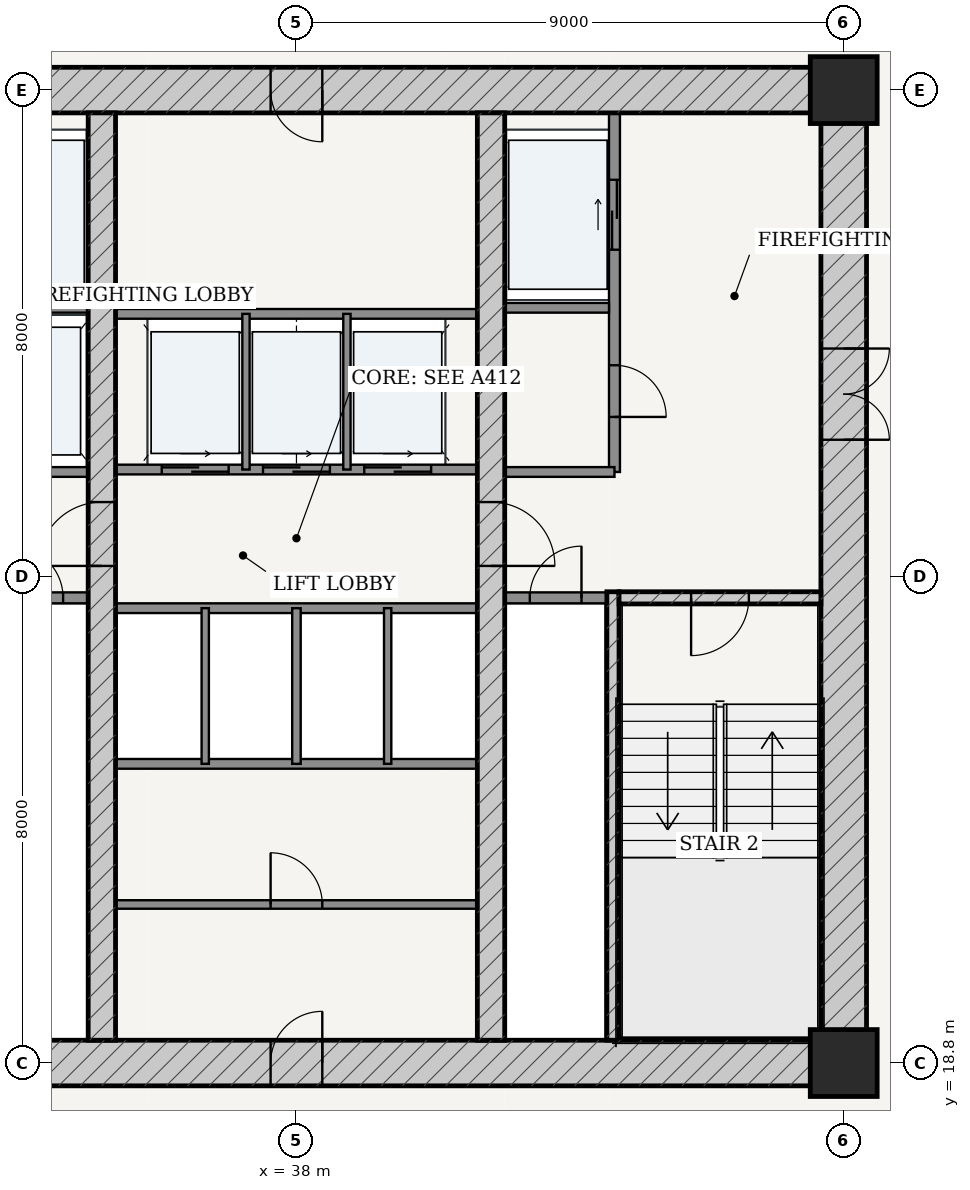
"""IFC4 building model, lengths in metres.
Left out: names, types, materials, properties, quantities, classifications, styles, units other than length and angle.
Written with IfcOpenShell. Run it as: python <this file> out.ifc"""

import sys

from ifc_helpers import new_model, si_unit, direction, frame, frame_2d, origin, origin_2d, place, context, subcontext, project, spatial, rectangle, extrude, source, transform, mapped, element, fill, save


model = new_model("IFC4")
c1 = context("Model", 3, precision=1e-05, world=origin(), true_north=direction((-0.2419218956, 0.970295726276)))
c2 = subcontext(c1, "Body", "Model", "MODEL_VIEW")
j1 = project(units=[si_unit("LENGTHUNIT", "METRE"), si_unit("PLANEANGLEUNIT", "RADIAN")], contexts=[c1])
p1 = place(None, origin())
s1 = spatial("IfcSite", under=j1, at=p1, CompositionType="ELEMENT")
p2 = place(p1, origin())
s2 = spatial("IfcBuilding", under=s1, at=p2, CompositionType="ELEMENT")
p3 = place(p2, frame((0.0, 0.0, 56.4)))
s3 = spatial("IfcBuildingStorey", under=s2, at=p3, CompositionType="ELEMENT", Elevation=56.4)
for number, where, z_axis, x_axis in (
    (1, (47.0, 18.8, 0.0), (0.0, 0.0, 1.0), (1.0, 0.0, 0.0)),
    (2, (47.0, 34.8, 0.0), (0.0, 0.0, 1.0), (1.0, 0.0, 0.0)),
):
    element("IfcColumn", number, at=place(p3, frame(where, z_axis=z_axis, x_axis=x_axis)), inside=s3, PredefinedType="COLUMN", context=c2, shape_type="SweptSolid", body=[
        extrude(rectangle(XDim=1.1, YDim=1.1, at=origin_2d()), origin(), (0.0, 0.0, 1.0), 3.6),
    ])
p4 = place(p3, frame((28.625, 18.8, 0.0), z_axis=(0.0, 0.0, 1.0), x_axis=(1.0, 0.0, 0.0)))
e3 = element("IfcWall", 3, at=p4, inside=s3, PredefinedType="SHEAR", context=c2, shape_type="SweptSolid", body=[
    extrude(rectangle(XDim=18.75, YDim=0.75, at=frame_2d((9.375, 0.0))), origin(), (0.0, 0.0, 1.0), 3.32),
])
p5 = place(p4, frame((8.95, 0.0, 0.0)))
e4 = element("IfcOpeningElement", 4, at=p5, cuts=e3, PredefinedType="OPENING", context=c2, shape_type="SweptSolid", body=[
    extrude(rectangle(XDim=0.85, YDim=2.1, at=frame_2d((0.425, 1.05))), frame((0.0, 0.385, 0.0), z_axis=(0.0, -1.0, 0.0), x_axis=(1.0, 0.0, 0.0)), (0.0, 0.0, 1.0), 0.77),
])
p6 = place(p3, frame((28.625, 34.8, 0.0), z_axis=(0.0, 0.0, 1.0), x_axis=(1.0, 0.0, 0.0)))
e5 = element("IfcWall", 5, at=p6, inside=s3, PredefinedType="SHEAR", context=c2, shape_type="SweptSolid", body=[
    extrude(rectangle(XDim=18.75, YDim=0.75, at=frame_2d((9.375, 0.0))), origin(), (0.0, 0.0, 1.0), 3.32),
])
p7 = place(p6, frame((8.95, 0.0, 0.0)))
e6 = element("IfcOpeningElement", 6, at=p7, cuts=e5, PredefinedType="OPENING", context=c2, shape_type="SweptSolid", body=[
    extrude(rectangle(XDim=0.85, YDim=2.1, at=frame_2d((0.425, 1.05))), frame((0.0, 0.385, 0.0), z_axis=(0.0, -1.0, 0.0), x_axis=(1.0, 0.0, 0.0)), (0.0, 0.0, 1.0), 0.77),
])
p8 = place(p3, frame((47.0, 19.175, 0.0), z_axis=(0.0, 0.0, 1.0), x_axis=(0.0, 1.0, 0.0)))
e7 = element("IfcWall", 7, at=p8, inside=s3, PredefinedType="SHEAR", context=c2, shape_type="SweptSolid", body=[
    extrude(rectangle(XDim=15.25, YDim=0.75, at=frame_2d((7.625, 0.0))), origin(), (0.0, 0.0, 1.0), 3.32),
])
p9 = place(p8, frame((9.875, 0.0, 0.0)))
e8 = element("IfcOpeningElement", 8, at=p9, cuts=e7, PredefinedType="OPENING", context=c2, shape_type="SweptSolid", body=[
    extrude(rectangle(XDim=1.5, YDim=2.2, at=frame_2d((0.75, 1.1))), frame((0.0, 0.385, 0.0), z_axis=(0.0, -1.0, 0.0), x_axis=(1.0, 0.0, 0.0)), (0.0, 0.0, 1.0), 0.77),
])
p10 = place(p3, frame((43.205, 19.175, 0.0), z_axis=(0.0, 0.0, 1.0), x_axis=(0.0, 1.0, 0.0)))
e9 = element("IfcWall", 9, at=p10, inside=s3, PredefinedType="SOLIDWALL", context=c2, shape_type="SweptSolid", body=[
    extrude(rectangle(XDim=7.375, YDim=0.2, at=frame_2d((3.688, 0.0))), origin(), (0.0, 0.0, 1.0), 3.32),
])
p11 = place(p3, frame((43.305, 26.45, 0.0), z_axis=(0.0, 0.0, 1.0), x_axis=(1.0, 0.0, 0.0)))
e10 = element("IfcWall", 10, at=p11, inside=s3, PredefinedType="SOLIDWALL", context=c2, shape_type="SweptSolid", body=[
    extrude(rectangle(XDim=3.32, YDim=0.2, at=frame_2d((1.66, 0.0))), origin(), (0.0, 0.0, 1.0), 3.32),
])
p12 = place(p11, frame((1.185, 0.0, 0.0)))
e11 = element("IfcOpeningElement", 11, at=p12, cuts=e10, PredefinedType="OPENING", context=c2, shape_type="SweptSolid", body=[
    extrude(rectangle(XDim=0.95, YDim=2.15, at=frame_2d((0.475, 1.075))), frame((0.0, 0.11, 0.0), z_axis=(0.0, -1.0, 0.0), x_axis=(1.0, 0.0, 0.0)), (0.0, 0.0, 1.0), 0.22),
])
p13 = place(p3, frame((34.8, 19.175, 0.0), z_axis=(0.0, 0.0, 1.0), x_axis=(0.0, 1.0, 0.0)))
e12 = element("IfcWall", 12, at=p13, inside=s3, PredefinedType="SHEAR", context=c2, shape_type="SweptSolid", body=[
    extrude(rectangle(XDim=15.25, YDim=0.45, at=frame_2d((7.625, 0.0))), origin(), (0.0, 0.0, 1.0), 3.32),
])
p14 = place(p13, frame((7.8, 0.0, 0.0)))
e13 = element("IfcOpeningElement", 13, at=p14, cuts=e12, PredefinedType="OPENING", context=c2, shape_type="SweptSolid", body=[
    extrude(rectangle(XDim=1.05, YDim=2.15, at=frame_2d((0.525, 1.075))), frame((0.0, 0.235, 0.0), z_axis=(0.0, -1.0, 0.0), x_axis=(1.0, 0.0, 0.0)), (0.0, 0.0, 1.0), 0.47),
])
p15 = place(p3, frame((41.2, 19.175, 0.0), z_axis=(0.0, 0.0, 1.0), x_axis=(0.0, 1.0, 0.0)))
e14 = element("IfcWall", 14, at=p15, inside=s3, PredefinedType="SHEAR", context=c2, shape_type="SweptSolid", body=[
    extrude(rectangle(XDim=15.25, YDim=0.45, at=frame_2d((7.625, 0.0))), origin(), (0.0, 0.0, 1.0), 3.32),
])
p16 = place(p15, frame((7.8, 0.0, 0.0)))
e15 = element("IfcOpeningElement", 15, at=p16, cuts=e14, PredefinedType="OPENING", context=c2, shape_type="SweptSolid", body=[
    extrude(rectangle(XDim=1.05, YDim=2.15, at=frame_2d((0.525, 1.075))), frame((0.0, 0.235, 0.0), z_axis=(0.0, -1.0, 0.0), x_axis=(1.0, 0.0, 0.0)), (0.0, 0.0, 1.0), 0.47),
])
p17 = place(p3, frame((32.9, 26.45, 0.0), z_axis=(0.0, 0.0, 1.0), x_axis=(1.0, 0.0, 0.0)))
e16 = element("IfcWall", 16, at=p17, inside=s3, PredefinedType="PARTITIONING", context=c2, shape_type="SweptSolid", body=[
    extrude(rectangle(XDim=1.675, YDim=0.18, at=frame_2d((0.837, 0.0))), origin(), (0.0, 0.0, 1.0), 3.32),
])
p18 = place(p17, frame((0.413, 0.0, 0.0)))
e17 = element("IfcOpeningElement", 17, at=p18, cuts=e16, PredefinedType="OPENING", context=c2, shape_type="SweptSolid", body=[
    extrude(rectangle(XDim=0.85, YDim=2.1, at=frame_2d((0.425, 1.05))), frame((0.0, 0.1, 0.0), z_axis=(0.0, -1.0, 0.0), x_axis=(1.0, 0.0, 0.0)), (0.0, 0.0, 1.0), 0.2),
])
p19 = place(p3, frame((41.425, 26.45, 0.0), z_axis=(0.0, 0.0, 1.0), x_axis=(1.0, 0.0, 0.0)))
e18 = element("IfcWall", 18, at=p19, inside=s3, PredefinedType="PARTITIONING", context=c2, shape_type="SweptSolid", body=[
    extrude(rectangle(XDim=1.675, YDim=0.18, at=frame_2d((0.837, 0.0))), origin(), (0.0, 0.0, 1.0), 3.32),
])
p20 = place(p19, frame((0.413, 0.0, 0.0)))
e19 = element("IfcOpeningElement", 19, at=p20, cuts=e18, PredefinedType="OPENING", context=c2, shape_type="SweptSolid", body=[
    extrude(rectangle(XDim=0.85, YDim=2.1, at=frame_2d((0.425, 1.05))), frame((0.0, 0.1, 0.0), z_axis=(0.0, -1.0, 0.0), x_axis=(1.0, 0.0, 0.0)), (0.0, 0.0, 1.0), 0.2),
])
p21 = place(p3, frame((32.86, 31.22, 0.0), z_axis=(0.0, 0.0, 1.0), x_axis=(1.0, 0.0, 0.0)))
e20 = element("IfcWall", 20, at=p21, inside=s3, PredefinedType="PARTITIONING", context=c2, shape_type="SweptSolid", body=[
    extrude(rectangle(XDim=1.715, YDim=0.16, at=frame_2d((0.857, 0.0))), origin(), (0.0, 0.0, 1.0), 3.32),
])
p22 = place(p3, frame((32.77, 28.52, 0.0), z_axis=(0.0, 0.0, 1.0), x_axis=(1.0, 0.0, 0.0)))
e21 = element("IfcWall", 21, at=p22, inside=s3, PredefinedType="PARTITIONING", context=c2, shape_type="SweptSolid", body=[
    extrude(rectangle(XDim=1.805, YDim=0.16, at=frame_2d((0.902, 0.0))), origin(), (0.0, 0.0, 1.0), 3.32),
])
p23 = place(p3, frame((43.23, 28.52, 0.0), z_axis=(0.0, 0.0, 1.0), x_axis=(0.0, 1.0, 0.0)))
e22 = element("IfcWall", 22, at=p23, inside=s3, PredefinedType="PARTITIONING", context=c2, shape_type="SweptSolid", body=[
    extrude(rectangle(XDim=5.905, YDim=0.18, at=frame_2d((2.953, 0.0))), origin(), (0.0, 0.0, 1.0), 3.32),
])
p24 = place(p23, frame((0.905, 0.0, 0.0)))
e23 = element("IfcOpeningElement", 23, at=p24, cuts=e22, PredefinedType="OPENING", context=c2, shape_type="SweptSolid", body=[
    extrude(rectangle(XDim=0.85, YDim=2.1, at=frame_2d((0.425, 1.05))), frame((0.0, 0.1, 0.0), z_axis=(0.0, -1.0, 0.0), x_axis=(1.0, 0.0, 0.0)), (0.0, 0.0, 1.0), 0.2),
])
p25 = place(p23, frame((3.655, 0.0, 0.0)))
e24 = element("IfcOpeningElement", 24, at=p25, cuts=e22, PredefinedType="OPENING", context=c2, shape_type="SweptSolid", body=[
    extrude(rectangle(XDim=1.15, YDim=2.2, at=frame_2d((0.575, 1.1))), frame((0.0, 0.1, 0.0), z_axis=(0.0, -1.0, 0.0), x_axis=(1.0, 0.0, 0.0)), (0.0, 0.0, 1.0), 0.2),
])
p26 = place(p3, frame((41.425, 31.22, 0.0), z_axis=(0.0, 0.0, 1.0), x_axis=(1.0, 0.0, 0.0)))
e25 = element("IfcWall", 25, at=p26, inside=s3, PredefinedType="PARTITIONING", context=c2, shape_type="SweptSolid", body=[
    extrude(rectangle(XDim=1.715, YDim=0.16, at=frame_2d((0.857, 0.0))), origin(), (0.0, 0.0, 1.0), 3.32),
])
p27 = place(p3, frame((41.425, 28.52, 0.0), z_axis=(0.0, 0.0, 1.0), x_axis=(1.0, 0.0, 0.0)))
e26 = element("IfcWall", 26, at=p27, inside=s3, PredefinedType="PARTITIONING", context=c2, shape_type="SweptSolid", body=[
    extrude(rectangle(XDim=1.805, YDim=0.16, at=frame_2d((0.902, 0.0))), origin(), (0.0, 0.0, 1.0), 3.32),
])
p28 = place(p3, frame((35.025, 28.56, 0.0), z_axis=(0.0, 0.0, 1.0), x_axis=(1.0, 0.0, 0.0)))
e27 = element("IfcWall", 27, at=p28, inside=s3, PredefinedType="PARTITIONING", context=c2, shape_type="SweptSolid", body=[
    extrude(rectangle(XDim=5.95, YDim=0.16, at=frame_2d((2.975, 0.0))), origin(), (0.0, 0.0, 1.0), 3.32),
])
p29 = place(p28, frame((0.76, 0.0, 0.0)))
e28 = element("IfcOpeningElement", 28, at=p29, cuts=e27, PredefinedType="OPENING", context=c2, shape_type="SweptSolid", body=[
    extrude(rectangle(XDim=1.1, YDim=2.2, at=frame_2d((0.55, 1.1))), frame((0.0, 0.09, 0.0), z_axis=(0.0, -1.0, 0.0), x_axis=(1.0, 0.0, 0.0)), (0.0, 0.0, 1.0), 0.18),
])
p30 = place(p28, frame((2.425, 0.0, 0.0)))
e29 = element("IfcOpeningElement", 29, at=p30, cuts=e27, PredefinedType="OPENING", context=c2, shape_type="SweptSolid", body=[
    extrude(rectangle(XDim=1.1, YDim=2.2, at=frame_2d((0.55, 1.1))), frame((0.0, 0.09, 0.0), z_axis=(0.0, -1.0, 0.0), x_axis=(1.0, 0.0, 0.0)), (0.0, 0.0, 1.0), 0.18),
])
p31 = place(p28, frame((4.09, 0.0, 0.0)))
e30 = element("IfcOpeningElement", 30, at=p31, cuts=e27, PredefinedType="OPENING", context=c2, shape_type="SweptSolid", body=[
    extrude(rectangle(XDim=1.1, YDim=2.2, at=frame_2d((0.55, 1.1))), frame((0.0, 0.09, 0.0), z_axis=(0.0, -1.0, 0.0), x_axis=(1.0, 0.0, 0.0)), (0.0, 0.0, 1.0), 0.18),
])
p32 = place(p3, frame((35.025, 31.12, 0.0), z_axis=(0.0, 0.0, 1.0), x_axis=(1.0, 0.0, 0.0)))
e31 = element("IfcWall", 31, at=p32, inside=s3, PredefinedType="PARTITIONING", context=c2, shape_type="SweptSolid", body=[
    extrude(rectangle(XDim=5.95, YDim=0.16, at=frame_2d((2.975, 0.0))), origin(), (0.0, 0.0, 1.0), 3.32),
])
for number, where, z_axis, x_axis in (
    (32, (37.17, 28.56, 0.0), (0.0, 0.0, 1.0), (0.0, 1.0, 0.0)),
    (33, (38.83, 28.56, 0.0), (0.0, 0.0, 1.0), (0.0, 1.0, 0.0)),
):
    element("IfcWall", number, at=place(p3, frame(where, z_axis=z_axis, x_axis=x_axis)), inside=s3, PredefinedType="PARTITIONING", context=c2, shape_type="SweptSolid", body=[
        extrude(rectangle(XDim=2.56, YDim=0.12, at=frame_2d((1.28, 0.0))), origin(), (0.0, 0.0, 1.0), 3.32),
    ])
for number, where, z_axis, x_axis in (
    (34, (35.025, 26.28, 0.0), (0.0, 0.0, 1.0), (1.0, 0.0, 0.0)),
    (35, (35.025, 23.72, 0.0), (0.0, 0.0, 1.0), (1.0, 0.0, 0.0)),
):
    element("IfcWall", number, at=place(p3, frame(where, z_axis=z_axis, x_axis=x_axis)), inside=s3, PredefinedType="PARTITIONING", context=c2, shape_type="SweptSolid", body=[
        extrude(rectangle(XDim=5.95, YDim=0.16, at=frame_2d((2.975, 0.0))), origin(), (0.0, 0.0, 1.0), 3.32),
    ])
p33 = place(p3, frame((36.5, 23.72, 0.0), z_axis=(0.0, 0.0, 1.0), x_axis=(0.0, 1.0, 0.0)))
e36 = element("IfcWall", 36, at=p33, inside=s3, PredefinedType="PARTITIONING", context=c2, shape_type="SweptSolid", body=[
    extrude(rectangle(XDim=2.56, YDim=0.12, at=frame_2d((1.28, 0.0))), origin(), (0.0, 0.0, 1.0), 3.32),
])
p34 = place(p3, frame((38.0, 23.72, 0.0), z_axis=(0.0, 0.0, 1.0), x_axis=(0.0, 1.0, 0.0)))
e37 = element("IfcWall", 37, at=p34, inside=s3, PredefinedType="PARTITIONING", context=c2, shape_type="SweptSolid", body=[
    extrude(rectangle(XDim=2.56, YDim=0.14, at=frame_2d((1.28, 0.0))), origin(), (0.0, 0.0, 1.0), 3.32),
])
p35 = place(p3, frame((39.5, 23.72, 0.0), z_axis=(0.0, 0.0, 1.0), x_axis=(0.0, 1.0, 0.0)))
e38 = element("IfcWall", 38, at=p35, inside=s3, PredefinedType="PARTITIONING", context=c2, shape_type="SweptSolid", body=[
    extrude(rectangle(XDim=2.56, YDim=0.12, at=frame_2d((1.28, 0.0))), origin(), (0.0, 0.0, 1.0), 3.32),
])
p36 = place(p3, frame((35.025, 21.407, 0.0), z_axis=(0.0, 0.0, 1.0), x_axis=(1.0, 0.0, 0.0)))
e39 = element("IfcWall", 39, at=p36, inside=s3, PredefinedType="PARTITIONING", context=c2, shape_type="SweptSolid", body=[
    extrude(rectangle(XDim=5.95, YDim=0.14, at=frame_2d((2.975, 0.0))), origin(), (0.0, 0.0, 1.0), 3.32),
])
p37 = place(p36, frame((2.55, 0.0, 0.0)))
e40 = element("IfcOpeningElement", 40, at=p37, cuts=e39, PredefinedType="OPENING", context=c2, shape_type="SweptSolid", body=[
    extrude(rectangle(XDim=0.85, YDim=2.1, at=frame_2d((0.425, 1.05))), frame((0.0, 0.08, 0.0), z_axis=(0.0, -1.0, 0.0), x_axis=(1.0, 0.0, 0.0)), (0.0, 0.0, 1.0), 0.16),
])
m1 = source(origin(), c2, "Body", "SweptSolid", [
    extrude(rectangle(XDim=1.5, YDim=2.2, at=frame_2d((0.75, 1.1))), frame((0.0, 0.025, 0.0), z_axis=(0.0, -1.0, 0.0), x_axis=(1.0, 0.0, 0.0)), (0.0, 0.0, 1.0), 0.05),
])
p38 = place(p9, frame((1.5, 0.0, 0.0), z_axis=(0.0, 0.0, 1.0), x_axis=(-1.0, 0.0, 0.0)))
e41 = element("IfcDoor", 41, at=p38, inside=s3, OperationType="DOUBLE_DOOR_SINGLE_SWING", PredefinedType="DOOR", context=c2, shape_type="MappedRepresentation", body=[
    mapped(m1, transform((0.0, 0.0, 0.0), scale=1.0)),
])
fill(e8, e41)
m2 = source(origin(), c2, "Body", "SweptSolid", [
    extrude(rectangle(XDim=1.05, YDim=2.15, at=frame_2d((0.525, 1.075))), frame((0.0, 0.025, 0.0), z_axis=(0.0, -1.0, 0.0), x_axis=(1.0, 0.0, 0.0)), (0.0, 0.0, 1.0), 0.05),
])
p39 = place(p14, origin())
e42 = element("IfcDoor", 42, at=p39, inside=s3, OperationType="SINGLE_SWING_LEFT", PredefinedType="DOOR", context=c2, shape_type="MappedRepresentation", body=[
    mapped(m2, transform((0.0, 0.0, 0.0), scale=1.0)),
])
fill(e13, e42)
p40 = place(p16, frame((1.05, 0.0, 0.0), z_axis=(0.0, 0.0, 1.0), x_axis=(-1.0, 0.0, 0.0)))
e43 = element("IfcDoor", 43, at=p40, inside=s3, OperationType="SINGLE_SWING_RIGHT", PredefinedType="DOOR", context=c2, shape_type="MappedRepresentation", body=[
    mapped(m2, transform((0.0, 0.0, 0.0), scale=1.0)),
])
fill(e15, e43)
m3 = source(origin(), c2, "Body", "SweptSolid", [
    extrude(rectangle(XDim=0.95, YDim=2.15, at=frame_2d((0.475, 1.075))), frame((0.0, 0.025, 0.0), z_axis=(0.0, -1.0, 0.0), x_axis=(1.0, 0.0, 0.0)), (0.0, 0.0, 1.0), 0.05),
])
p41 = place(p12, frame((0.95, 0.0, 0.0), z_axis=(0.0, 0.0, 1.0), x_axis=(-1.0, 0.0, 0.0)))
e44 = element("IfcDoor", 44, at=p41, inside=s3, OperationType="SINGLE_SWING_RIGHT", PredefinedType="DOOR", context=c2, shape_type="MappedRepresentation", body=[
    mapped(m3, transform((0.0, 0.0, 0.0), scale=1.0)),
])
fill(e11, e44)
m4 = source(origin(), c2, "Body", "SweptSolid", [
    extrude(rectangle(XDim=0.85, YDim=2.1, at=frame_2d((0.425, 1.05))), frame((0.0, 0.025, 0.0), z_axis=(0.0, -1.0, 0.0), x_axis=(1.0, 0.0, 0.0)), (0.0, 0.0, 1.0), 0.05),
])
p42 = place(p18, origin())
e45 = element("IfcDoor", 45, at=p42, inside=s3, OperationType="SINGLE_SWING_LEFT", PredefinedType="DOOR", context=c2, shape_type="MappedRepresentation", body=[
    mapped(m4, transform((0.0, 0.0, 0.0), scale=1.0)),
])
fill(e17, e45)
p43 = place(p20, origin())
e46 = element("IfcDoor", 46, at=p43, inside=s3, OperationType="SINGLE_SWING_RIGHT", PredefinedType="DOOR", context=c2, shape_type="MappedRepresentation", body=[
    mapped(m4, transform((0.0, 0.0, 0.0), scale=1.0)),
])
fill(e19, e46)
p44 = place(p24, frame((0.85, 0.0, 0.0), z_axis=(0.0, 0.0, 1.0), x_axis=(-1.0, 0.0, 0.0)))
e47 = element("IfcDoor", 47, at=p44, inside=s3, OperationType="SINGLE_SWING_RIGHT", PredefinedType="DOOR", context=c2, shape_type="MappedRepresentation", body=[
    mapped(m4, transform((0.0, 0.0, 0.0), scale=1.0)),
])
fill(e23, e47)
p45 = place(p7, frame((0.85, 0.0, 0.0), z_axis=(0.0, 0.0, 1.0), x_axis=(-1.0, 0.0, 0.0)))
e48 = element("IfcDoor", 48, at=p45, inside=s3, OperationType="SINGLE_SWING_LEFT", PredefinedType="DOOR", context=c2, shape_type="MappedRepresentation", body=[
    mapped(m4, transform((0.0, 0.0, 0.0), scale=1.0)),
])
fill(e6, e48)
p46 = place(p5, origin())
e49 = element("IfcDoor", 49, at=p46, inside=s3, OperationType="SINGLE_SWING_RIGHT", PredefinedType="DOOR", context=c2, shape_type="MappedRepresentation", body=[
    mapped(m4, transform((0.0, 0.0, 0.0), scale=1.0)),
])
fill(e4, e49)
p47 = place(p37, origin())
e50 = element("IfcDoor", 50, at=p47, inside=s3, OperationType="SINGLE_SWING_LEFT", PredefinedType="DOOR", context=c2, shape_type="MappedRepresentation", body=[
    mapped(m4, transform((0.0, 0.0, 0.0), scale=1.0)),
])
fill(e40, e50)
m5 = source(origin(), c2, "Body", "SweptSolid", [
    extrude(rectangle(XDim=1.15, YDim=2.2, at=frame_2d((0.575, 1.1))), frame((0.0, 0.025, 0.0), z_axis=(0.0, -1.0, 0.0), x_axis=(1.0, 0.0, 0.0)), (0.0, 0.0, 1.0), 0.05),
])
p48 = place(p25, origin())
e51 = element("IfcDoor", 51, at=p48, inside=s3, OperationType="DOUBLE_DOOR_SLIDING", PredefinedType="DOOR", context=c2, shape_type="MappedRepresentation", body=[
    mapped(m5, transform((0.0, 0.0, 0.0), scale=1.0)),
])
fill(e24, e51)
m6 = source(origin(), c2, "Body", "SweptSolid", [
    extrude(rectangle(XDim=1.1, YDim=2.2, at=frame_2d((0.55, 1.1))), frame((0.0, 0.025, 0.0), z_axis=(0.0, -1.0, 0.0), x_axis=(1.0, 0.0, 0.0)), (0.0, 0.0, 1.0), 0.05),
])
p49 = place(p29, origin())
e52 = element("IfcDoor", 52, at=p49, inside=s3, OperationType="DOUBLE_DOOR_SLIDING", PredefinedType="DOOR", context=c2, shape_type="MappedRepresentation", body=[
    mapped(m6, transform((0.0, 0.0, 0.0), scale=1.0)),
])
fill(e28, e52)
p50 = place(p30, origin())
e53 = element("IfcDoor", 53, at=p50, inside=s3, OperationType="DOUBLE_DOOR_SLIDING", PredefinedType="DOOR", context=c2, shape_type="MappedRepresentation", body=[
    mapped(m6, transform((0.0, 0.0, 0.0), scale=1.0)),
])
fill(e29, e53)
p51 = place(p31, origin())
e54 = element("IfcDoor", 54, at=p51, inside=s3, OperationType="DOUBLE_DOOR_SLIDING", PredefinedType="DOOR", context=c2, shape_type="MappedRepresentation", body=[
    mapped(m6, transform((0.0, 0.0, 0.0), scale=1.0)),
])
fill(e30, e54)
save(model, sys.argv[1])
